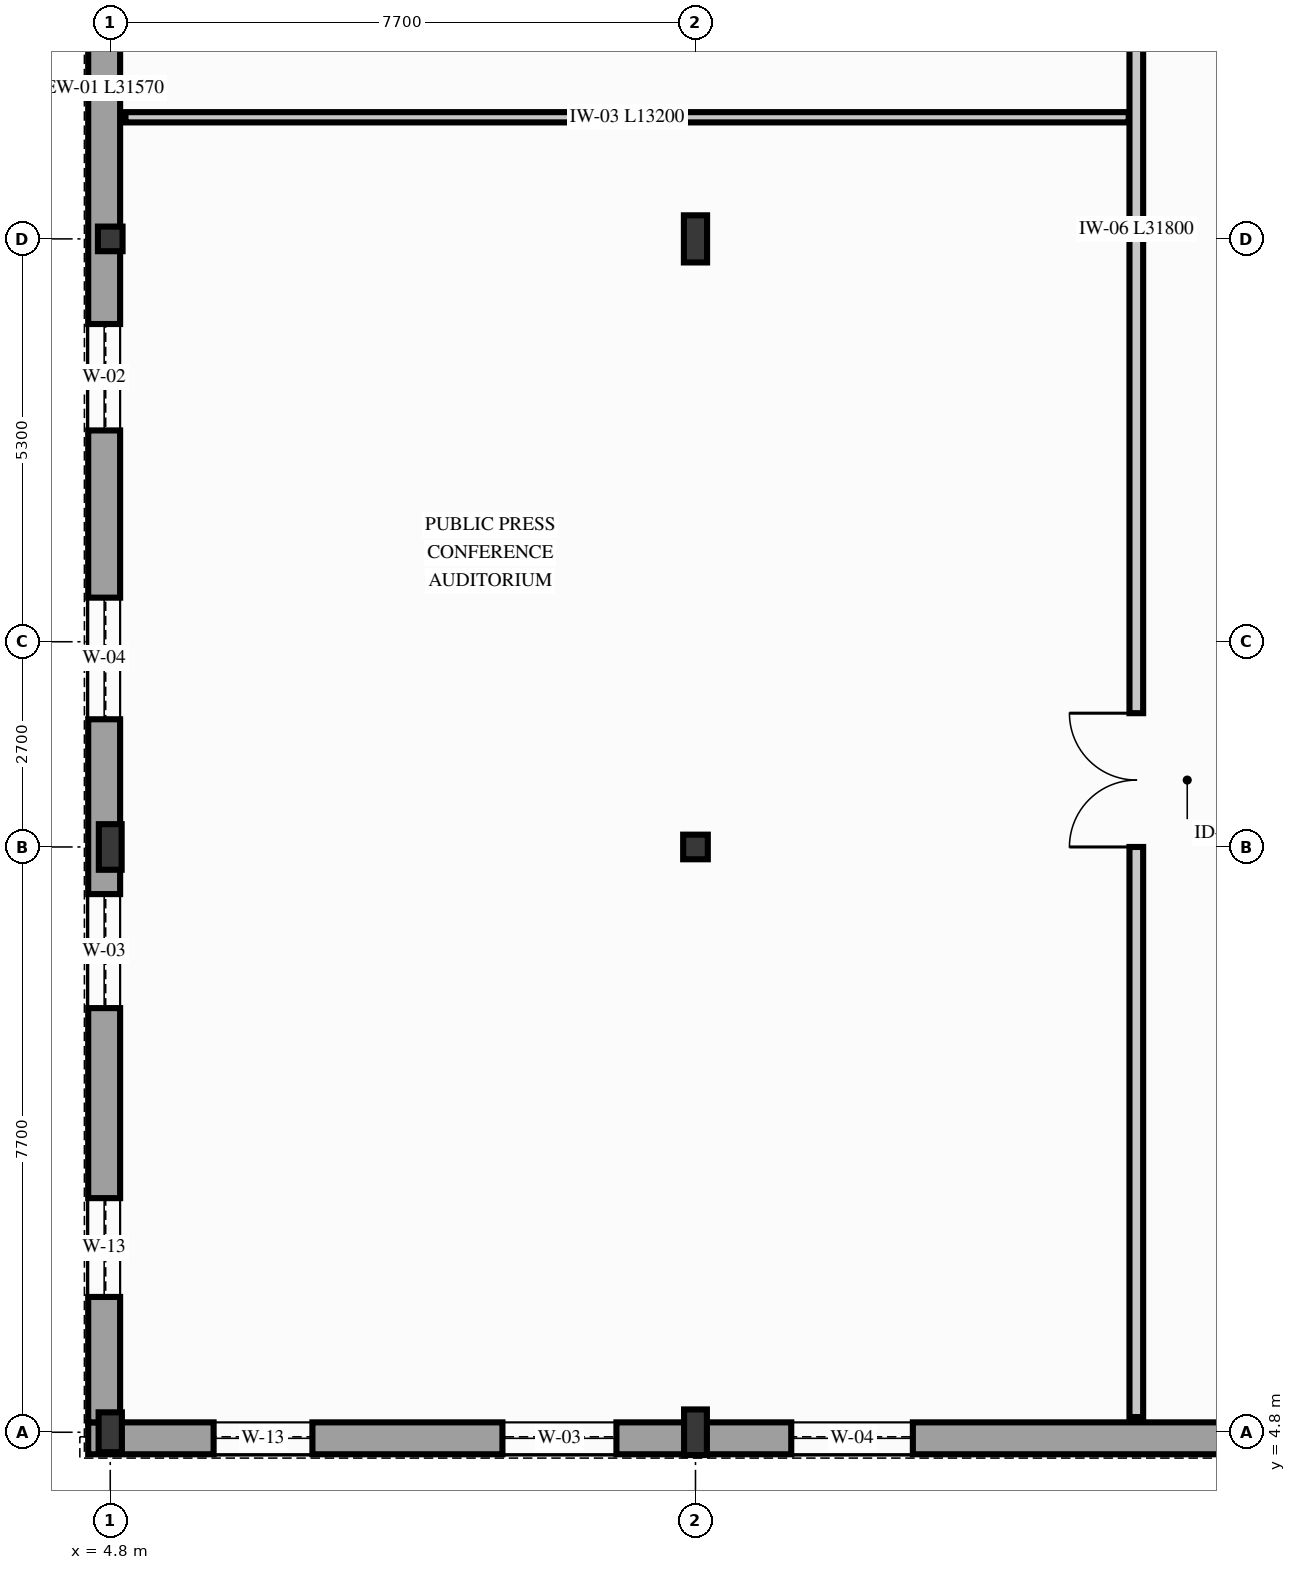
"""IFC4 building model, lengths in metres.
Left out: names, types, materials, properties, quantities, classifications, styles, units other than length and angle.
Written with IfcOpenShell. Run it as: python <this file> out.ifc"""

import sys

from ifc_helpers import new_model, si_unit, direction, frame, frame_2d, origin, origin_2d, place, context, subcontext, project, spatial, rectangle, hollow_circle, i_section, extrude, element, fill, save


model = new_model("IFC4")
c1 = context("Model", 3, precision=1e-05, world=origin(), true_north=direction((0.0, 1.0)))
c2 = subcontext(c1, "Body", "Model", "MODEL_VIEW")
j1 = project(units=[si_unit("LENGTHUNIT", "METRE"), si_unit("PLANEANGLEUNIT", "RADIAN")], contexts=[c1])
p1 = place(None, origin())
s1 = spatial("IfcSite", under=j1, at=p1, CompositionType="ELEMENT")
p2 = place(p1, origin())
s2 = spatial("IfcBuilding", under=s1, at=p2, CompositionType="ELEMENT")
p3 = place(p2, frame((0.0, 0.0, 5.1)))
s3 = spatial("IfcBuildingStorey", under=s2, at=p3, CompositionType="ELEMENT", Elevation=5.1)
p4 = place(p3, frame((4.8, 4.8, 0.0), z_axis=(0.0, 0.0, 1.0), x_axis=(1.0, 0.0, 0.0)))
e1 = element("IfcColumn", 1, at=p4, inside=s3, PredefinedType="COLUMN", context=c2, shape_type="SweptSolid", body=[
    extrude(i_section(OverallWidth=0.306, OverallDepth=0.524, WebThickness=0.021, FlangeThickness=0.04, FilletRadius=0.027, at=origin_2d()), origin(), (0.0, 0.0, 1.0), 4.2),
])
p5 = place(p3, frame((4.8, 12.5, 0.0), z_axis=(0.0, 0.0, 1.0), x_axis=(1.0, 0.0, 0.0)))
e2 = element("IfcColumn", 2, at=p5, inside=s3, PredefinedType="COLUMN", context=c2, shape_type="SweptSolid", body=[
    extrude(i_section(OverallWidth=0.3, OverallDepth=0.6, WebThickness=0.015, FlangeThickness=0.03, FilletRadius=0.027, at=origin_2d()), origin(), (0.0, 0.0, 1.0), 4.2),
])
p6 = place(p3, frame((4.8, 20.5, 0.0), z_axis=(0.0, 0.0, 1.0), x_axis=(1.0, 0.0, 0.0)))
e3 = element("IfcColumn", 3, at=p6, inside=s3, PredefinedType="COLUMN", context=c2, shape_type="SweptSolid", body=[
    extrude(hollow_circle(Radius=0.162, WallThickness=0.016, at=origin_2d()), origin(), (0.0, 0.0, 1.0), 4.2),
])
p7 = place(p3, frame((12.5, 4.8, 0.0), z_axis=(0.0, 0.0, 1.0), x_axis=(1.0, 0.0, 0.0)))
e4 = element("IfcColumn", 4, at=p7, inside=s3, PredefinedType="COLUMN", context=c2, shape_type="SweptSolid", body=[
    extrude(i_section(OverallWidth=0.3, OverallDepth=0.6, WebThickness=0.015, FlangeThickness=0.03, FilletRadius=0.027, at=origin_2d()), origin(), (0.0, 0.0, 1.0), 4.2),
])
p8 = place(p3, frame((12.5, 12.5, 0.0), z_axis=(0.0, 0.0, 1.0), x_axis=(1.0, 0.0, 0.0)))
e5 = element("IfcColumn", 5, at=p8, inside=s3, PredefinedType="COLUMN", context=c2, shape_type="SweptSolid", body=[
    extrude(hollow_circle(Radius=0.162, WallThickness=0.016, at=origin_2d()), origin(), (0.0, 0.0, 1.0), 4.2),
])
p9 = place(p3, frame((12.5, 20.5, 0.0), z_axis=(0.0, 0.0, 1.0), x_axis=(1.0, 0.0, 0.0)))
e6 = element("IfcColumn", 6, at=p9, inside=s3, PredefinedType="COLUMN", context=c2, shape_type="SweptSolid", body=[
    extrude(i_section(OverallWidth=0.305, OverallDepth=0.62, WebThickness=0.021, FlangeThickness=0.04, FilletRadius=0.027, at=origin_2d()), origin(), (0.0, 0.0, 1.0), 4.2),
])
p10 = place(p3, frame((4.51, 4.72, 0.0), z_axis=(0.0, 0.0, 1.0), x_axis=(1.0, 0.0, 0.0)))
e7 = element("IfcWall", 7, at=p10, inside=s3, PredefinedType="SOLIDWALL", context=c2, shape_type="SweptSolid", body=[
    extrude(rectangle(XDim=30.08, YDim=0.42, at=frame_2d((15.04, 0.0))), origin(), (0.0, 0.0, 1.0), 3.68),
])
p11 = place(p10, frame((1.65, 0.0, 0.85)))
e8 = element("IfcOpeningElement", 8, at=p11, cuts=e7, PredefinedType="OPENING", context=c2, shape_type="SweptSolid", body=[
    extrude(rectangle(XDim=1.3, YDim=2.15, at=frame_2d((0.65, 1.075))), frame((0.0, 0.22, 0.0), z_axis=(0.0, -1.0, 0.0), x_axis=(1.0, 0.0, 0.0)), (0.0, 0.0, 1.0), 0.44),
])
p12 = place(p10, frame((5.45, 0.0, 0.84)))
e9 = element("IfcOpeningElement", 9, at=p12, cuts=e7, PredefinedType="OPENING", context=c2, shape_type="SweptSolid", body=[
    extrude(rectangle(XDim=1.5, YDim=2.3, at=frame_2d((0.75, 1.15))), frame((0.0, 0.22, 0.0), z_axis=(0.0, -1.0, 0.0), x_axis=(1.0, 0.0, 0.0)), (0.0, 0.0, 1.0), 0.44),
])
p13 = place(p10, frame((9.25, 0.0, 0.74)))
e10 = element("IfcOpeningElement", 10, at=p13, cuts=e7, PredefinedType="OPENING", context=c2, shape_type="SweptSolid", body=[
    extrude(rectangle(XDim=1.6, YDim=2.4, at=frame_2d((0.8, 1.2))), frame((0.0, 0.22, 0.0), z_axis=(0.0, -1.0, 0.0), x_axis=(1.0, 0.0, 0.0)), (0.0, 0.0, 1.0), 0.44),
])
p14 = place(p10, frame((20.65, 0.0, 0.74)))
e11 = element("IfcOpeningElement", 11, at=p14, cuts=e7, PredefinedType="OPENING", context=c2, shape_type="SweptSolid", body=[
    extrude(rectangle(XDim=1.8, YDim=2.4, at=frame_2d((0.9, 1.2))), frame((0.0, 0.22, 0.0), z_axis=(0.0, -1.0, 0.0), x_axis=(1.0, 0.0, 0.0)), (0.0, 0.0, 1.0), 0.44),
])
p15 = place(p3, frame((4.72, 4.93, 0.0), z_axis=(0.0, 0.0, 1.0), x_axis=(0.0, 1.0, 0.0)))
e12 = element("IfcWall", 12, at=p15, inside=s3, PredefinedType="SOLIDWALL", context=c2, shape_type="SweptSolid", body=[
    extrude(rectangle(XDim=31.57, YDim=0.42, at=frame_2d((15.785, 0.0))), origin(), (0.0, 0.0, 1.0), 3.68),
])
p16 = place(p15, frame((1.65, 0.0, 0.85)))
e13 = element("IfcOpeningElement", 13, at=p16, cuts=e12, PredefinedType="OPENING", context=c2, shape_type="SweptSolid", body=[
    extrude(rectangle(XDim=1.3, YDim=2.15, at=frame_2d((0.65, 1.075))), frame((0.0, 0.22, 0.0), z_axis=(0.0, -1.0, 0.0), x_axis=(1.0, 0.0, 0.0)), (0.0, 0.0, 1.0), 0.44),
])
p17 = place(p15, frame((5.45, 0.0, 0.84)))
e14 = element("IfcOpeningElement", 14, at=p17, cuts=e12, PredefinedType="OPENING", context=c2, shape_type="SweptSolid", body=[
    extrude(rectangle(XDim=1.5, YDim=2.3, at=frame_2d((0.75, 1.15))), frame((0.0, 0.22, 0.0), z_axis=(0.0, -1.0, 0.0), x_axis=(1.0, 0.0, 0.0)), (0.0, 0.0, 1.0), 0.44),
])
p18 = place(p15, frame((9.25, 0.0, 0.74)))
e15 = element("IfcOpeningElement", 15, at=p18, cuts=e12, PredefinedType="OPENING", context=c2, shape_type="SweptSolid", body=[
    extrude(rectangle(XDim=1.6, YDim=2.4, at=frame_2d((0.8, 1.2))), frame((0.0, 0.22, 0.0), z_axis=(0.0, -1.0, 0.0), x_axis=(1.0, 0.0, 0.0)), (0.0, 0.0, 1.0), 0.44),
])
p19 = place(p15, frame((13.05, 0.0, 0.85)))
e16 = element("IfcOpeningElement", 16, at=p19, cuts=e12, PredefinedType="OPENING", context=c2, shape_type="SweptSolid", body=[
    extrude(rectangle(XDim=1.4, YDim=2.2, at=frame_2d((0.7, 1.1))), frame((0.0, 0.22, 0.0), z_axis=(0.0, -1.0, 0.0), x_axis=(1.0, 0.0, 0.0)), (0.0, 0.0, 1.0), 0.44),
])
p20 = place(p15, frame((20.65, 0.0, 0.74)))
e17 = element("IfcOpeningElement", 17, at=p20, cuts=e12, PredefinedType="OPENING", context=c2, shape_type="SweptSolid", body=[
    extrude(rectangle(XDim=1.8, YDim=2.4, at=frame_2d((0.9, 1.2))), frame((0.0, 0.22, 0.0), z_axis=(0.0, -1.0, 0.0), x_axis=(1.0, 0.0, 0.0)), (0.0, 0.0, 1.0), 0.44),
])
p21 = place(p15, frame((24.45, 0.0, 0.69)))
e18 = element("IfcOpeningElement", 18, at=p21, cuts=e12, PredefinedType="OPENING", context=c2, shape_type="SweptSolid", body=[
    extrude(rectangle(XDim=1.9, YDim=2.45, at=frame_2d((0.95, 1.225))), frame((0.0, 0.22, 0.0), z_axis=(0.0, -1.0, 0.0), x_axis=(1.0, 0.0, 0.0)), (0.0, 0.0, 1.0), 0.44),
])
p22 = place(p3, frame((18.3, 5.0, 0.0), z_axis=(0.0, 0.0, 1.0), x_axis=(0.0, 1.0, 0.0)))
e19 = element("IfcWall", 19, at=p22, inside=s3, PredefinedType="PARTITIONING", context=c2, shape_type="SweptSolid", body=[
    extrude(rectangle(XDim=31.8, YDim=0.18, at=frame_2d((15.9, 0.0))), origin(), (0.0, 0.0, 1.0), 3.678),
])
p23 = place(p22, frame((7.5, 0.0, 0.0)))
e20 = element("IfcOpeningElement", 20, at=p23, cuts=e19, PredefinedType="OPENING", context=c2, shape_type="SweptSolid", body=[
    extrude(rectangle(XDim=1.76, YDim=2.36, at=frame_2d((0.88, 1.18))), frame((0.0, 0.1, 0.0), z_axis=(0.0, -1.0, 0.0), x_axis=(1.0, 0.0, 0.0)), (0.0, 0.0, 1.0), 0.2),
])
p24 = place(p22, frame((22.0, 0.0, 0.0)))
e21 = element("IfcOpeningElement", 21, at=p24, cuts=e19, PredefinedType="OPENING", context=c2, shape_type="SweptSolid", body=[
    extrude(rectangle(XDim=0.9, YDim=2.1, at=frame_2d((0.45, 1.05))), frame((0.0, 0.1, 0.0), z_axis=(0.0, -1.0, 0.0), x_axis=(1.0, 0.0, 0.0)), (0.0, 0.0, 1.0), 0.2),
])
p25 = place(p3, frame((5.0, 22.1, 0.0), z_axis=(0.0, 0.0, 1.0), x_axis=(1.0, 0.0, 0.0)))
e22 = element("IfcWall", 22, at=p25, inside=s3, PredefinedType="PARTITIONING", context=c2, shape_type="SweptSolid", body=[
    extrude(rectangle(XDim=13.2, YDim=0.135, at=frame_2d((6.6, 0.0))), origin(), (0.0, 0.0, 1.0), 3.578),
])
p26 = place(p11, origin())
e23 = element("IfcWindow", 23, at=p26, inside=s3, PartitioningType="SINGLE_PANEL", PredefinedType="WINDOW", context=c2, shape_type="SweptSolid", body=[
    extrude(rectangle(XDim=1.3, YDim=2.15, at=frame_2d((0.65, 1.075))), frame((0.0, 0.03, 0.0), z_axis=(0.0, -1.0, 0.0), x_axis=(1.0, 0.0, 0.0)), (0.0, 0.0, 1.0), 0.06),
])
fill(e8, e23)
p27 = place(p12, origin())
e24 = element("IfcWindow", 24, at=p27, inside=s3, PartitioningType="SINGLE_PANEL", PredefinedType="WINDOW", context=c2, shape_type="SweptSolid", body=[
    extrude(rectangle(XDim=1.5, YDim=2.3, at=frame_2d((0.75, 1.15))), frame((0.0, 0.03, 0.0), z_axis=(0.0, -1.0, 0.0), x_axis=(1.0, 0.0, 0.0)), (0.0, 0.0, 1.0), 0.06),
])
fill(e9, e24)
p28 = place(p13, origin())
e25 = element("IfcWindow", 25, at=p28, inside=s3, PartitioningType="SINGLE_PANEL", PredefinedType="WINDOW", context=c2, shape_type="SweptSolid", body=[
    extrude(rectangle(XDim=1.6, YDim=2.4, at=frame_2d((0.8, 1.2))), frame((0.0, 0.03, 0.0), z_axis=(0.0, -1.0, 0.0), x_axis=(1.0, 0.0, 0.0)), (0.0, 0.0, 1.0), 0.06),
])
fill(e10, e25)
p29 = place(p16, origin())
e26 = element("IfcWindow", 26, at=p29, inside=s3, PartitioningType="SINGLE_PANEL", PredefinedType="WINDOW", context=c2, shape_type="SweptSolid", body=[
    extrude(rectangle(XDim=1.3, YDim=2.15, at=frame_2d((0.65, 1.075))), frame((0.0, 0.03, 0.0), z_axis=(0.0, -1.0, 0.0), x_axis=(1.0, 0.0, 0.0)), (0.0, 0.0, 1.0), 0.06),
])
fill(e13, e26)
p30 = place(p17, origin())
e27 = element("IfcWindow", 27, at=p30, inside=s3, PartitioningType="SINGLE_PANEL", PredefinedType="WINDOW", context=c2, shape_type="SweptSolid", body=[
    extrude(rectangle(XDim=1.5, YDim=2.3, at=frame_2d((0.75, 1.15))), frame((0.0, 0.03, 0.0), z_axis=(0.0, -1.0, 0.0), x_axis=(1.0, 0.0, 0.0)), (0.0, 0.0, 1.0), 0.06),
])
fill(e14, e27)
p31 = place(p18, origin())
e28 = element("IfcWindow", 28, at=p31, inside=s3, PartitioningType="SINGLE_PANEL", PredefinedType="WINDOW", context=c2, shape_type="SweptSolid", body=[
    extrude(rectangle(XDim=1.6, YDim=2.4, at=frame_2d((0.8, 1.2))), frame((0.0, 0.03, 0.0), z_axis=(0.0, -1.0, 0.0), x_axis=(1.0, 0.0, 0.0)), (0.0, 0.0, 1.0), 0.06),
])
fill(e15, e28)
p32 = place(p19, origin())
e29 = element("IfcWindow", 29, at=p32, inside=s3, PartitioningType="SINGLE_PANEL", PredefinedType="WINDOW", context=c2, shape_type="SweptSolid", body=[
    extrude(rectangle(XDim=1.4, YDim=2.2, at=frame_2d((0.7, 1.1))), frame((0.0, 0.03, 0.0), z_axis=(0.0, -1.0, 0.0), x_axis=(1.0, 0.0, 0.0)), (0.0, 0.0, 1.0), 0.06),
])
fill(e16, e29)
p33 = place(p23, origin())
e30 = element("IfcDoor", 30, at=p33, inside=s3, OperationType="DOUBLE_DOOR_SINGLE_SWING", PredefinedType="DOOR", context=c2, shape_type="SweptSolid", body=[
    extrude(rectangle(XDim=1.76, YDim=2.36, at=frame_2d((0.88, 1.18))), frame((0.0, 0.025, 0.0), z_axis=(0.0, -1.0, 0.0), x_axis=(1.0, 0.0, 0.0)), (0.0, 0.0, 1.0), 0.05),
])
fill(e20, e30)
save(model, sys.argv[1])
